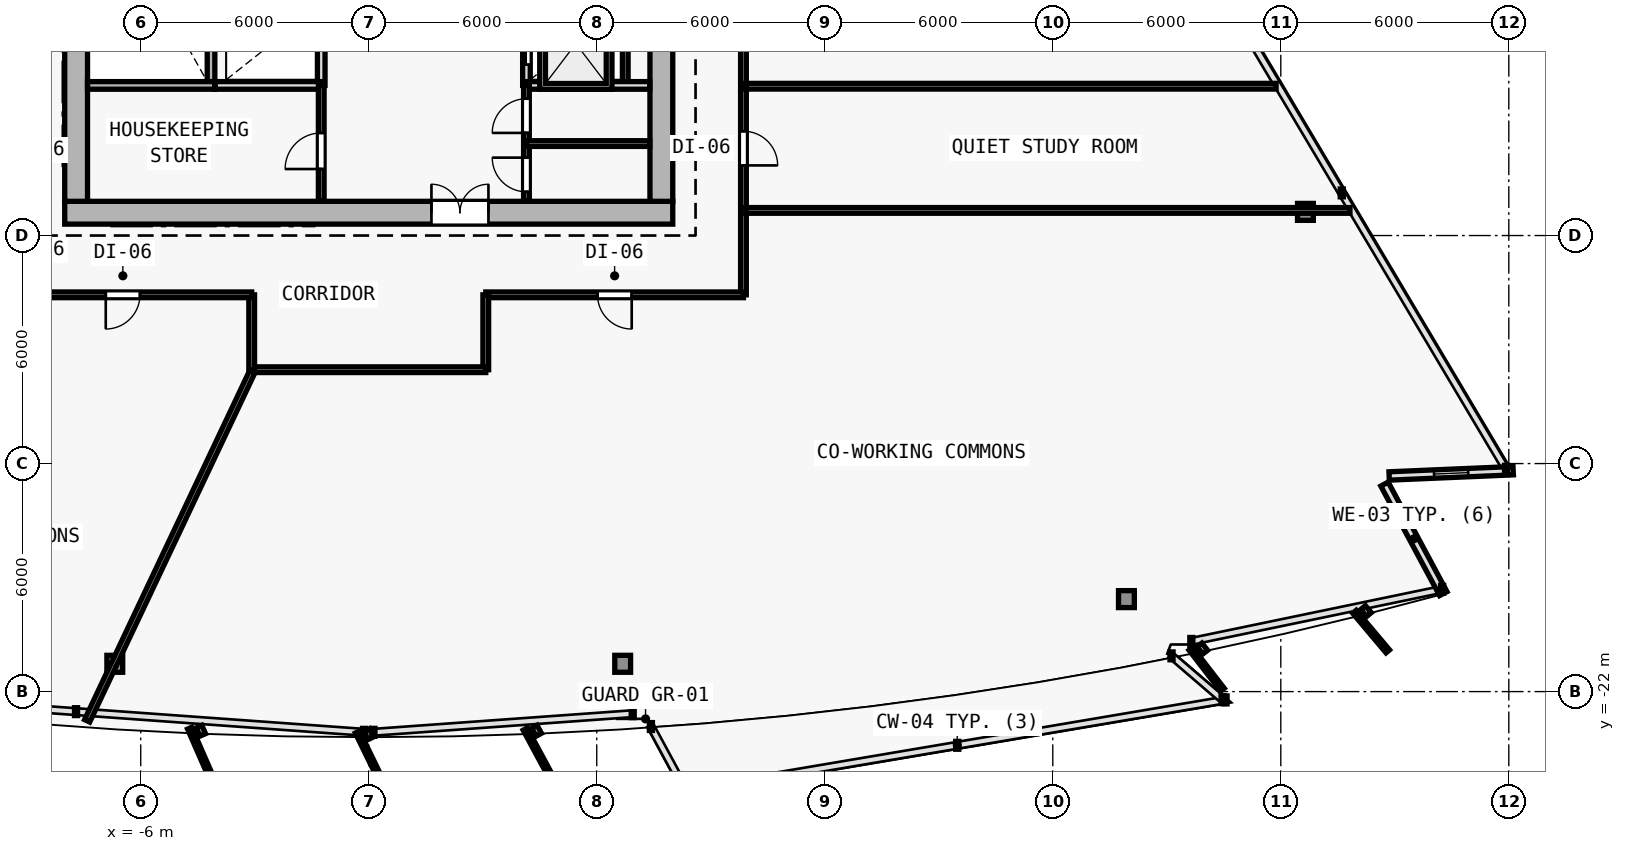
"""IFC4 building model, lengths in metres.
Left out: names, types, materials, properties, quantities, classifications, styles, units other than length and angle.
Written with IfcOpenShell. Run it as: python <this file> out.ifc"""

import sys

from ifc_helpers import new_model, si_unit, direction, frame, frame_2d, origin, origin_2d, place, context, subcontext, project, spatial, rectangle, i_section, extrude, element, fill, save


model = new_model("IFC4")
c1 = context("Model", 3, precision=1e-05, world=origin(), true_north=direction((0.0, 1.0)))
c2 = subcontext(c1, "Body", "Model", "MODEL_VIEW")
j1 = project(units=[si_unit("LENGTHUNIT", "METRE"), si_unit("PLANEANGLEUNIT", "RADIAN")], contexts=[c1])
p1 = place(None, origin())
s1 = spatial("IfcSite", under=j1, at=p1, CompositionType="ELEMENT")
p2 = place(p1, origin())
s2 = spatial("IfcBuilding", under=s1, at=p2, CompositionType="ELEMENT")
p3 = place(p2, frame((0.0, 0.0, 48.0)))
s3 = spatial("IfcBuildingStorey", under=s2, at=p3, CompositionType="ELEMENT", Elevation=48.0)
for number, where, z_axis, x_axis in (
    (1, (-7.7, -9.4, 0.0), (0.0, 0.0, 1.0), (1.0, 0.0, 0.0)),
    (2, (7.7, -9.4, 0.0), (0.0, 0.0, 1.0), (1.0, 0.0, 0.0)),
    (3, (0.0, -9.4, 0.0), (0.0, 0.0, 1.0), (1.0, 0.0, 0.0)),
):
    element("IfcColumn", number, at=place(p3, frame(where, z_axis=z_axis, x_axis=x_axis)), inside=s3, PredefinedType="COLUMN", context=c2, shape_type="SweptSolid", body=[
        extrude(i_section(OverallWidth=0.416, OverallDepth=0.446, WebThickness=0.025, FlangeThickness=0.04, FilletRadius=0.015, at=origin_2d()), origin(), (0.0, 0.0, 1.0), 3.6),
    ])
for number, where, z_axis, x_axis in (
    (4, (-6.682, -21.268, 0.006), (0.007, 0.035, 0.999), (-0.982, 0.191, 0.0)),
    (5, (6.682, -21.268, 0.006), (-0.007, 0.035, 0.999), (-0.982, -0.191, 0.0)),
):
    element("IfcColumn", number, at=place(p3, frame(where, z_axis=z_axis, x_axis=x_axis)), inside=s3, PredefinedType="COLUMN", context=c2, shape_type="SweptSolid", body=[
        extrude(i_section(OverallWidth=0.416, OverallDepth=0.446, WebThickness=0.025, FlangeThickness=0.04, FilletRadius=0.015, at=origin_2d()), origin(), (0.0, 0.0, 1.0), 3.591),
    ])
p4 = place(p3, frame((19.938, -19.566, 0.006), z_axis=(-0.020596339702, 0.033443561496, 0.99922836178), x_axis=(-0.851480003019, -0.52438707503, 0.0)))
e6 = element("IfcColumn", 6, at=p4, inside=s3, PredefinedType="COLUMN", context=c2, shape_type="SweptSolid", body=[
    extrude(i_section(OverallWidth=0.416, OverallDepth=0.446, WebThickness=0.025, FlangeThickness=0.04, FilletRadius=0.015, at=origin_2d()), origin(), (0.0, 0.0, 1.0), 3.592),
])
p5 = place(p3, frame((24.649, -9.378, 0.006), z_axis=(-0.026107436898, 0.021620221181, 0.999425318758), x_axis=(-0.637813971185, -0.770190455771, 0.0)))
e7 = element("IfcColumn", 7, at=p5, inside=s3, PredefinedType="COLUMN", context=c2, shape_type="SweptSolid", body=[
    extrude(i_section(OverallWidth=0.416, OverallDepth=0.446, WebThickness=0.025, FlangeThickness=0.04, FilletRadius=0.015, at=origin_2d()), origin(), (0.0, 0.0, 1.0), 3.591),
])
p6 = place(p3, frame((26.729, -16.54, 0.0), z_axis=(0.0, 0.0, 1.0), x_axis=(0.472830429959, -0.881153439819, 0.0)))
e8 = element("IfcWall", 8, at=p6, inside=s3, PredefinedType="SOLIDWALL", context=c2, shape_type="SweptSolid", body=[
    extrude(rectangle(XDim=3.27, YDim=0.22, at=frame_2d((1.635, 0.0))), origin(), (0.0, 0.0, 1.0), 3.35),
])
p7 = place(p3, frame((30.115, -16.188, 0.0), z_axis=(0.0, 0.0, 1.0), x_axis=(-0.999095638069, -0.042519477791, 0.0)))
e9 = element("IfcWall", 9, at=p7, inside=s3, PredefinedType="SOLIDWALL", context=c2, shape_type="SweptSolid", body=[
    extrude(rectangle(XDim=3.267, YDim=0.22, at=frame_2d((1.634, 0.0))), origin(), (0.0, 0.0, 1.0), 3.35),
])
p8 = place(p7, frame((1.184, 0.0, 0.62)))
e10 = element("IfcOpeningElement", 10, at=p8, cuts=e9, PredefinedType="OPENING", context=c2, shape_type="SweptSolid", body=[
    extrude(rectangle(XDim=0.9, YDim=1.6, at=frame_2d((0.45, 0.8))), frame((0.0, 0.12, 0.0), z_axis=(0.0, -1.0, 0.0), x_axis=(1.0, 0.0, 0.0)), (0.0, 0.0, 1.0), 0.24),
])
p9 = place(p3, frame((-8.0, -9.4, 0.0), z_axis=(0.0, 0.0, 1.0), x_axis=(1.0, 0.0, 0.0)))
e11 = element("IfcWall", 11, at=p9, inside=s3, PredefinedType="SHEAR", context=c2, shape_type="SweptSolid", body=[
    extrude(rectangle(XDim=16.0, YDim=0.6, at=frame_2d((8.0, 0.0))), origin(), (0.0, 0.0, 1.0), 3.35),
])
p10 = place(p9, frame((9.65, 0.0, 0.0)))
e12 = element("IfcOpeningElement", 12, at=p10, cuts=e11, PredefinedType="OPENING", context=c2, shape_type="SweptSolid", body=[
    extrude(rectangle(XDim=1.5, YDim=2.2, at=frame_2d((0.75, 1.1))), frame((0.0, 0.31, 0.0), z_axis=(0.0, -1.0, 0.0), x_axis=(1.0, 0.0, 0.0)), (0.0, 0.0, 1.0), 0.62),
])
p11 = place(p3, frame((-7.7, -9.1, 0.0), z_axis=(0.0, 0.0, 1.0), x_axis=(0.0, 1.0, 0.0)))
e13 = element("IfcWall", 13, at=p11, inside=s3, PredefinedType="SHEAR", context=c2, shape_type="SweptSolid", body=[
    extrude(rectangle(XDim=19.0, YDim=0.6, at=frame_2d((9.5, 0.0))), origin(), (0.0, 0.0, 1.0), 3.35),
])
p12 = place(p11, frame((12.65, 0.0, 0.0)))
e14 = element("IfcOpeningElement", 14, at=p12, cuts=e13, PredefinedType="OPENING", context=c2, shape_type="SweptSolid", body=[
    extrude(rectangle(XDim=1.1, YDim=2.15, at=frame_2d((0.55, 1.075))), frame((0.0, 0.31, 0.0), z_axis=(0.0, -1.0, 0.0), x_axis=(1.0, 0.0, 0.0)), (0.0, 0.0, 1.0), 0.62),
])
p13 = place(p3, frame((7.7, 9.9, 0.0), z_axis=(0.0, 0.0, 1.0), x_axis=(0.0, -1.0, 0.0)))
e15 = element("IfcWall", 15, at=p13, inside=s3, PredefinedType="SHEAR", context=c2, shape_type="SweptSolid", body=[
    extrude(rectangle(XDim=19.0, YDim=0.6, at=frame_2d((9.5, 0.0))), origin(), (0.0, 0.0, 1.0), 3.35),
])
p14 = place(p3, frame((-4.15, -5.95, 0.0), z_axis=(0.0, 0.0, 1.0), x_axis=(0.0, 1.0, 0.0)))
e16 = element("IfcWall", 16, at=p14, inside=s3, PredefinedType="SOLIDWALL", context=c2, shape_type="SweptSolid", body=[
    extrude(rectangle(XDim=7.2, YDim=0.2, at=frame_2d((3.6, 0.0))), origin(), (0.0, 0.0, 1.0), 3.35),
])
p15 = place(p3, frame((4.15, -6.05, 0.0), z_axis=(0.0, 0.0, 1.0), x_axis=(0.0, 1.0, 0.0)))
e17 = element("IfcWall", 17, at=p15, inside=s3, PredefinedType="SOLIDWALL", context=c2, shape_type="SweptSolid", body=[
    extrude(rectangle(XDim=8.7, YDim=0.2, at=frame_2d((4.35, 0.0))), origin(), (0.0, 0.0, 1.0), 3.35),
])
p16 = place(p15, frame((0.55, 0.0, 0.0)))
e18 = element("IfcOpeningElement", 18, at=p16, cuts=e17, PredefinedType="OPENING", context=c2, shape_type="SweptSolid", body=[
    extrude(rectangle(XDim=1.1, YDim=2.15, at=frame_2d((0.55, 1.075))), frame((0.0, 0.11, 0.0), z_axis=(0.0, -1.0, 0.0), x_axis=(1.0, 0.0, 0.0)), (0.0, 0.0, 1.0), 0.22),
])
p17 = place(p15, frame((2.65, 0.0, 0.0)))
e19 = element("IfcOpeningElement", 19, at=p17, cuts=e17, PredefinedType="OPENING", context=c2, shape_type="SweptSolid", body=[
    extrude(rectangle(XDim=1.1, YDim=2.15, at=frame_2d((0.55, 1.075))), frame((0.0, 0.11, 0.0), z_axis=(0.0, -1.0, 0.0), x_axis=(1.0, 0.0, 0.0)), (0.0, 0.0, 1.0), 0.22),
])
p18 = place(p15, frame((4.75, 0.0, 0.0)))
e20 = element("IfcOpeningElement", 20, at=p18, cuts=e17, PredefinedType="OPENING", context=c2, shape_type="SweptSolid", body=[
    extrude(rectangle(XDim=1.1, YDim=2.15, at=frame_2d((0.55, 1.075))), frame((0.0, 0.11, 0.0), z_axis=(0.0, -1.0, 0.0), x_axis=(1.0, 0.0, 0.0)), (0.0, 0.0, 1.0), 0.22),
])
p19 = place(p15, frame((6.85, 0.0, 0.0)))
e21 = element("IfcOpeningElement", 21, at=p19, cuts=e17, PredefinedType="OPENING", context=c2, shape_type="SweptSolid", body=[
    extrude(rectangle(XDim=1.1, YDim=2.15, at=frame_2d((0.55, 1.075))), frame((0.0, 0.11, 0.0), z_axis=(0.0, -1.0, 0.0), x_axis=(1.0, 0.0, 0.0)), (0.0, 0.0, 1.0), 0.22),
])
p20 = place(p3, frame((6.75, -6.05, 0.0), z_axis=(0.0, 0.0, 1.0), x_axis=(0.0, 1.0, 0.0)))
e22 = element("IfcWall", 22, at=p20, inside=s3, PredefinedType="PARTITIONING", context=c2, shape_type="SweptSolid", body=[
    extrude(rectangle(XDim=8.7, YDim=0.15, at=frame_2d((4.35, 0.0))), origin(), (0.0, 0.0, 1.0), 3.35),
])
p21 = place(p3, frame((-1.25, -6.05, 0.0), z_axis=(0.0, 0.0, 1.0), x_axis=(0.0, 1.0, 0.0)))
e23 = element("IfcWall", 23, at=p21, inside=s3, PredefinedType="SOLIDWALL", context=c2, shape_type="SweptSolid", body=[
    extrude(rectangle(XDim=8.7, YDim=0.2, at=frame_2d((4.35, 0.0))), origin(), (0.0, 0.0, 1.0), 3.35),
])
p22 = place(p3, frame((-7.4, -6.05, 0.0), z_axis=(0.0, 0.0, 1.0), x_axis=(1.0, 0.0, 0.0)))
e24 = element("IfcWall", 24, at=p22, inside=s3, PredefinedType="SOLIDWALL", context=c2, shape_type="SweptSolid", body=[
    extrude(rectangle(XDim=3.35, YDim=0.2, at=frame_2d((1.675, 0.0))), origin(), (0.0, 0.0, 1.0), 3.35),
])
p23 = place(p3, frame((-4.04, -6.05, 0.0), z_axis=(0.0, 0.0, 1.0), x_axis=(1.0, 0.0, 0.0)))
e25 = element("IfcWall", 25, at=p23, inside=s3, PredefinedType="SOLIDWALL", context=c2, shape_type="SweptSolid", body=[
    extrude(rectangle(XDim=2.79, YDim=0.2, at=frame_2d((1.395, 0.0))), origin(), (0.0, 0.0, 1.0), 3.35),
])
p24 = place(p3, frame((4.15, -6.05, 0.0), z_axis=(0.0, 0.0, 1.0), x_axis=(1.0, 0.0, 0.0)))
e26 = element("IfcWall", 26, at=p24, inside=s3, PredefinedType="SOLIDWALL", context=c2, shape_type="SweptSolid", body=[
    extrude(rectangle(XDim=3.245, YDim=0.2, at=frame_2d((1.623, 0.0))), origin(), (0.0, 0.0, 1.0), 3.35),
])
p25 = place(p3, frame((-1.25, -9.095, 0.0), z_axis=(0.0, 0.0, 1.0), x_axis=(0.0, 1.0, 0.0)))
e27 = element("IfcWall", 27, at=p25, inside=s3, PredefinedType="PARTITIONING", context=c2, shape_type="SweptSolid", body=[
    extrude(rectangle(XDim=3.045, YDim=0.15, at=frame_2d((1.522, 0.0))), origin(), (0.0, 0.0, 1.0), 3.35),
])
p26 = place(p25, frame((0.845, 0.0, 0.0)))
e28 = element("IfcOpeningElement", 28, at=p26, cuts=e27, PredefinedType="OPENING", context=c2, shape_type="SweptSolid", body=[
    extrude(rectangle(XDim=0.95, YDim=2.1, at=frame_2d((0.475, 1.05))), frame((0.0, 0.085, 0.0), z_axis=(0.0, -1.0, 0.0), x_axis=(1.0, 0.0, 0.0)), (0.0, 0.0, 1.0), 0.17),
])
p27 = place(p3, frame((4.15, -9.095, 0.0), z_axis=(0.0, 0.0, 1.0), x_axis=(0.0, 1.0, 0.0)))
e29 = element("IfcWall", 29, at=p27, inside=s3, PredefinedType="PARTITIONING", context=c2, shape_type="SweptSolid", body=[
    extrude(rectangle(XDim=3.045, YDim=0.15, at=frame_2d((1.522, 0.0))), origin(), (0.0, 0.0, 1.0), 3.35),
])
p28 = place(p27, frame((0.245, 0.0, 0.0)))
e30 = element("IfcOpeningElement", 30, at=p28, cuts=e29, PredefinedType="OPENING", context=c2, shape_type="SweptSolid", body=[
    extrude(rectangle(XDim=0.9, YDim=2.1, at=frame_2d((0.45, 1.05))), frame((0.0, 0.085, 0.0), z_axis=(0.0, -1.0, 0.0), x_axis=(1.0, 0.0, 0.0)), (0.0, 0.0, 1.0), 0.17),
])
p29 = place(p27, frame((1.795, 0.0, 0.0)))
e31 = element("IfcOpeningElement", 31, at=p29, cuts=e29, PredefinedType="OPENING", context=c2, shape_type="SweptSolid", body=[
    extrude(rectangle(XDim=0.9, YDim=2.1, at=frame_2d((0.45, 1.05))), frame((0.0, 0.085, 0.0), z_axis=(0.0, -1.0, 0.0), x_axis=(1.0, 0.0, 0.0)), (0.0, 0.0, 1.0), 0.17),
])
p30 = place(p3, frame((4.15, -7.58, 0.0), z_axis=(0.0, 0.0, 1.0), x_axis=(1.0, 0.0, 0.0)))
e32 = element("IfcWall", 32, at=p30, inside=s3, PredefinedType="PARTITIONING", context=c2, shape_type="SweptSolid", body=[
    extrude(rectangle(XDim=3.245, YDim=0.15, at=frame_2d((1.623, 0.0))), origin(), (0.0, 0.0, 1.0), 3.35),
])
p31 = place(p3, frame((9.86, 8.426, 0.0), z_axis=(0.0, 0.0, 1.0), x_axis=(0.0, -1.0, 0.0)))
e33 = element("IfcWall", 33, at=p31, inside=s3, PredefinedType="PARTITIONING", context=c2, shape_type="SweptSolid", body=[
    extrude(rectangle(XDim=19.986, YDim=0.15, at=frame_2d((9.993, 0.0))), origin(), (0.0, 0.0, 1.0), 2.609),
])
p32 = place(p31, frame((15.681, 0.0, 0.0)))
e34 = element("IfcOpeningElement", 34, at=p32, cuts=e33, PredefinedType="OPENING", context=c2, shape_type="SweptSolid", body=[
    extrude(rectangle(XDim=0.9, YDim=2.1, at=frame_2d((0.45, 1.05))), frame((0.0, 0.085, 0.0), z_axis=(0.0, -1.0, 0.0), x_axis=(1.0, 0.0, 0.0)), (0.0, 0.0, 1.0), 0.17),
])
p33 = place(p31, frame((12.483, 0.0, 0.0)))
e35 = element("IfcOpeningElement", 35, at=p33, cuts=e33, PredefinedType="OPENING", context=c2, shape_type="SweptSolid", body=[
    extrude(rectangle(XDim=0.9, YDim=2.1, at=frame_2d((0.45, 1.05))), frame((0.0, 0.085, 0.0), z_axis=(0.0, -1.0, 0.0), x_axis=(1.0, 0.0, 0.0)), (0.0, 0.0, 1.0), 0.17),
])
p34 = place(p31, frame((9.322, 0.0, 0.0)))
e36 = element("IfcOpeningElement", 36, at=p34, cuts=e33, PredefinedType="OPENING", context=c2, shape_type="SweptSolid", body=[
    extrude(rectangle(XDim=0.9, YDim=2.1, at=frame_2d((0.45, 1.05))), frame((0.0, 0.085, 0.0), z_axis=(0.0, -1.0, 0.0), x_axis=(1.0, 0.0, 0.0)), (0.0, 0.0, 1.0), 0.17),
])
p35 = place(p31, frame((6.636, 0.0, 0.0)))
e37 = element("IfcOpeningElement", 37, at=p35, cuts=e33, PredefinedType="OPENING", context=c2, shape_type="SweptSolid", body=[
    extrude(rectangle(XDim=0.9, YDim=2.1, at=frame_2d((0.45, 1.05))), frame((0.0, 0.085, 0.0), z_axis=(0.0, -1.0, 0.0), x_axis=(1.0, 0.0, 0.0)), (0.0, 0.0, 1.0), 0.17),
])
p36 = place(p31, frame((3.997, 0.0, 0.0)))
e38 = element("IfcOpeningElement", 38, at=p36, cuts=e33, PredefinedType="OPENING", context=c2, shape_type="SweptSolid", body=[
    extrude(rectangle(XDim=0.9, YDim=2.1, at=frame_2d((0.45, 1.05))), frame((0.0, 0.085, 0.0), z_axis=(0.0, -1.0, 0.0), x_axis=(1.0, 0.0, 0.0)), (0.0, 0.0, 1.0), 0.17),
])
p37 = place(p31, frame((1.086, 0.0, 0.0)))
e39 = element("IfcOpeningElement", 39, at=p37, cuts=e33, PredefinedType="OPENING", context=c2, shape_type="SweptSolid", body=[
    extrude(rectangle(XDim=0.9, YDim=2.1, at=frame_2d((0.45, 1.05))), frame((0.0, 0.085, 0.0), z_axis=(0.0, -1.0, 0.0), x_axis=(1.0, 0.0, 0.0)), (0.0, 0.0, 1.0), 0.17),
])
p38 = place(p3, frame((9.86, -11.56, 0.0), z_axis=(0.0, 0.0, 1.0), x_axis=(-1.0, 0.0, 0.0)))
e40 = element("IfcWall", 40, at=p38, inside=s3, PredefinedType="PARTITIONING", context=c2, shape_type="SweptSolid", body=[
    extrude(rectangle(XDim=6.78, YDim=0.15, at=frame_2d((3.39, 0.0))), origin(), (0.0, 0.0, 1.0), 2.609),
])
p39 = place(p38, frame((2.94, 0.0, 0.0)))
e41 = element("IfcOpeningElement", 41, at=p39, cuts=e40, PredefinedType="OPENING", context=c2, shape_type="SweptSolid", body=[
    extrude(rectangle(XDim=0.9, YDim=2.1, at=frame_2d((0.45, 1.05))), frame((0.0, 0.085, 0.0), z_axis=(0.0, -1.0, 0.0), x_axis=(1.0, 0.0, 0.0)), (0.0, 0.0, 1.0), 0.17),
])
p40 = place(p3, frame((3.08, -11.56, 0.0), z_axis=(0.0, 0.0, 1.0), x_axis=(0.0, -1.0, 0.0)))
e42 = element("IfcWall", 42, at=p40, inside=s3, PredefinedType="PARTITIONING", context=c2, shape_type="SweptSolid", body=[
    extrude(rectangle(XDim=1.97, YDim=0.15, at=frame_2d((0.985, 0.0))), origin(), (0.0, 0.0, 1.0), 3.055),
])
p41 = place(p3, frame((3.08, -13.53, 0.0), z_axis=(0.0, 0.0, 1.0), x_axis=(-1.0, 0.0, 0.0)))
e43 = element("IfcWall", 43, at=p41, inside=s3, PredefinedType="PARTITIONING", context=c2, shape_type="SweptSolid", body=[
    extrude(rectangle(XDim=6.16, YDim=0.15, at=frame_2d((3.08, 0.0))), origin(), (0.0, 0.0, 1.0), 2.725),
])
p42 = place(p3, frame((-3.08, -13.53, 0.0), z_axis=(0.0, 0.0, 1.0), x_axis=(0.0, 1.0, 0.0)))
e44 = element("IfcWall", 44, at=p42, inside=s3, PredefinedType="PARTITIONING", context=c2, shape_type="SweptSolid", body=[
    extrude(rectangle(XDim=1.97, YDim=0.15, at=frame_2d((0.985, 0.0))), origin(), (0.0, 0.0, 1.0), 2.965),
])
p43 = place(p3, frame((-3.08, -11.56, 0.0), z_axis=(0.0, 0.0, 1.0), x_axis=(-1.0, 0.0, 0.0)))
e45 = element("IfcWall", 45, at=p43, inside=s3, PredefinedType="PARTITIONING", context=c2, shape_type="SweptSolid", body=[
    extrude(rectangle(XDim=6.78, YDim=0.15, at=frame_2d((3.39, 0.0))), origin(), (0.0, 0.0, 1.0), 2.725),
])
p44 = place(p43, frame((2.94, 0.0, 0.0)))
e46 = element("IfcOpeningElement", 46, at=p44, cuts=e45, PredefinedType="OPENING", context=c2, shape_type="SweptSolid", body=[
    extrude(rectangle(XDim=0.9, YDim=2.1, at=frame_2d((0.45, 1.05))), frame((0.0, 0.085, 0.0), z_axis=(0.0, -1.0, 0.0), x_axis=(1.0, 0.0, 0.0)), (0.0, 0.0, 1.0), 0.17),
])
p45 = place(p3, frame((-3.061, -13.576, 0.0), z_axis=(0.0, 0.0, 1.0), x_axis=(-0.427557967945, -0.903987933574, 0.0)))
e47 = element("IfcWall", 47, at=p45, inside=s3, PredefinedType="PARTITIONING", context=c2, shape_type="SweptSolid", body=[
    extrude(rectangle(XDim=10.171, YDim=0.15, at=frame_2d((5.085, 0.0))), origin(), (0.0, 0.0, 1.0), 2.725),
])
p46 = place(p3, frame((9.92, -9.339, 0.0), z_axis=(0.0, 0.0, 1.0), x_axis=(1.0, 0.0, 0.0)))
e48 = element("IfcWall", 48, at=p46, inside=s3, PredefinedType="PARTITIONING", context=c2, shape_type="SweptSolid", body=[
    extrude(rectangle(XDim=15.9, YDim=0.15, at=frame_2d((7.95, 0.0))), origin(), (0.0, 0.0, 1.0), 2.609),
])
p47 = place(p3, frame((9.92, -6.071, 0.0), z_axis=(0.0, 0.0, 1.0), x_axis=(1.0, 0.0, 0.0)))
e49 = element("IfcWall", 49, at=p47, inside=s3, PredefinedType="PARTITIONING", context=c2, shape_type="SweptSolid", body=[
    extrude(rectangle(XDim=13.957, YDim=0.15, at=frame_2d((6.978, 0.0))), origin(), (0.0, 0.0, 1.0), 2.725),
])
p48 = place(p8, origin())
e50 = element("IfcWindow", 50, at=p48, inside=s3, PartitioningType="SINGLE_PANEL", PredefinedType="WINDOW", context=c2, shape_type="SweptSolid", body=[
    extrude(rectangle(XDim=0.9, YDim=1.6, at=frame_2d((0.45, 0.8))), frame((0.0, 0.03, 0.0), z_axis=(0.0, -1.0, 0.0), x_axis=(1.0, 0.0, 0.0)), (0.0, 0.0, 1.0), 0.06),
])
fill(e10, e50)
p49 = place(p10, origin())
e51 = element("IfcDoor", 51, at=p49, inside=s3, OperationType="DOUBLE_DOOR_SINGLE_SWING", PredefinedType="DOOR", context=c2, shape_type="SweptSolid", body=[
    extrude(rectangle(XDim=1.5, YDim=2.2, at=frame_2d((0.75, 1.1))), frame((0.0, 0.025, 0.0), z_axis=(0.0, -1.0, 0.0), x_axis=(1.0, 0.0, 0.0)), (0.0, 0.0, 1.0), 0.05),
])
fill(e12, e51)
p50 = place(p16, origin())
e52 = element("IfcDoor", 52, at=p50, inside=s3, OperationType="DOUBLE_DOOR_SLIDING", PredefinedType="DOOR", context=c2, shape_type="SweptSolid", body=[
    extrude(rectangle(XDim=1.1, YDim=2.15, at=frame_2d((0.55, 1.075))), frame((0.0, 0.025, 0.0), z_axis=(0.0, -1.0, 0.0), x_axis=(1.0, 0.0, 0.0)), (0.0, 0.0, 1.0), 0.05),
])
fill(e18, e52)
p51 = place(p26, origin())
e53 = element("IfcDoor", 53, at=p51, inside=s3, OperationType="SINGLE_SWING_LEFT", PredefinedType="DOOR", context=c2, shape_type="SweptSolid", body=[
    extrude(rectangle(XDim=0.95, YDim=2.1, at=frame_2d((0.475, 1.05))), frame((0.0, 0.025, 0.0), z_axis=(0.0, -1.0, 0.0), x_axis=(1.0, 0.0, 0.0)), (0.0, 0.0, 1.0), 0.05),
])
fill(e28, e53)
p52 = place(p28, origin())
e54 = element("IfcDoor", 54, at=p52, inside=s3, OperationType="SINGLE_SWING_RIGHT", PredefinedType="DOOR", context=c2, shape_type="SweptSolid", body=[
    extrude(rectangle(XDim=0.9, YDim=2.1, at=frame_2d((0.45, 1.05))), frame((0.0, 0.025, 0.0), z_axis=(0.0, -1.0, 0.0), x_axis=(1.0, 0.0, 0.0)), (0.0, 0.0, 1.0), 0.05),
])
fill(e30, e54)
p53 = place(p29, origin())
e55 = element("IfcDoor", 55, at=p53, inside=s3, OperationType="SINGLE_SWING_LEFT", PredefinedType="DOOR", context=c2, shape_type="SweptSolid", body=[
    extrude(rectangle(XDim=0.9, YDim=2.1, at=frame_2d((0.45, 1.05))), frame((0.0, 0.025, 0.0), z_axis=(0.0, -1.0, 0.0), x_axis=(1.0, 0.0, 0.0)), (0.0, 0.0, 1.0), 0.05),
])
fill(e31, e55)
p54 = place(p44, origin())
e56 = element("IfcDoor", 56, at=p54, inside=s3, OperationType="SINGLE_SWING_RIGHT", PredefinedType="DOOR", context=c2, shape_type="SweptSolid", body=[
    extrude(rectangle(XDim=0.9, YDim=2.1, at=frame_2d((0.45, 1.05))), frame((0.0, 0.025, 0.0), z_axis=(0.0, -1.0, 0.0), x_axis=(1.0, 0.0, 0.0)), (0.0, 0.0, 1.0), 0.05),
])
fill(e46, e56)
p55 = place(p39, origin())
e57 = element("IfcDoor", 57, at=p55, inside=s3, OperationType="SINGLE_SWING_LEFT", PredefinedType="DOOR", context=c2, shape_type="SweptSolid", body=[
    extrude(rectangle(XDim=0.9, YDim=2.1, at=frame_2d((0.45, 1.05))), frame((0.0, 0.025, 0.0), z_axis=(0.0, -1.0, 0.0), x_axis=(1.0, 0.0, 0.0)), (0.0, 0.0, 1.0), 0.05),
])
fill(e41, e57)
p56 = place(p32, origin())
e58 = element("IfcDoor", 58, at=p56, inside=s3, OperationType="SINGLE_SWING_RIGHT", PredefinedType="DOOR", context=c2, shape_type="SweptSolid", body=[
    extrude(rectangle(XDim=0.9, YDim=2.1, at=frame_2d((0.45, 1.05))), frame((0.0, 0.025, 0.0), z_axis=(0.0, -1.0, 0.0), x_axis=(1.0, 0.0, 0.0)), (0.0, 0.0, 1.0), 0.05),
])
fill(e34, e58)
save(model, sys.argv[1])
